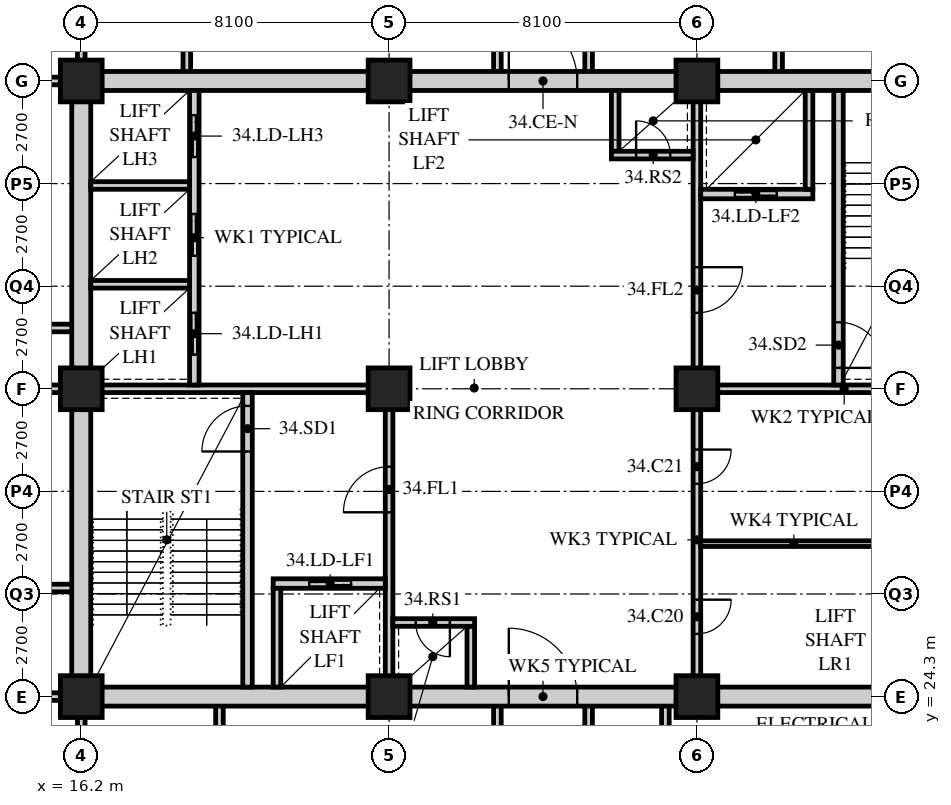
"""IFC4 building model, lengths in metres.
Left out: names, types, materials, properties, quantities, classifications, styles, units other than length and angle.
Written with IfcOpenShell. Run it as: python <this file> out.ifc"""

import sys

from ifc_helpers import new_model, si_unit, direction, frame, frame_2d, origin, origin_2d, place, context, subcontext, project, spatial, rectangle, hollow_rectangle, extrude, element, fill, save


model = new_model("IFC4")
c1 = context("Model", 3, precision=1e-05, world=origin(), true_north=direction((0.0, 1.0)))
c2 = subcontext(c1, "Body", "Model", "MODEL_VIEW")
j1 = project(units=[si_unit("LENGTHUNIT", "METRE"), si_unit("PLANEANGLEUNIT", "RADIAN")], contexts=[c1])
p1 = place(None, origin())
s1 = spatial("IfcSite", under=j1, at=p1, CompositionType="ELEMENT")
p2 = place(p1, origin())
s2 = spatial("IfcBuilding", under=s1, at=p2, CompositionType="ELEMENT")
p3 = place(p2, frame((0.0, 0.0, 134.0)))
s3 = spatial("IfcBuildingStorey", under=s2, at=p3, CompositionType="ELEMENT", Elevation=134.0)
for number, where, z_axis, x_axis in (
    (1, (16.2, 24.3, 0.0), (0.0, 0.0, 1.0), (1.0, 0.0, 0.0)),
    (2, (16.2, 32.4, 0.0), (0.0, 0.0, 1.0), (1.0, 0.0, 0.0)),
    (3, (16.2, 40.5, 0.0), (0.0, 0.0, 1.0), (1.0, 0.0, 0.0)),
    (4, (24.3, 24.3, 0.0), (0.0, 0.0, 1.0), (1.0, 0.0, 0.0)),
    (5, (24.3, 32.4, 0.0), (0.0, 0.0, 1.0), (1.0, 0.0, 0.0)),
    (6, (24.3, 40.5, 0.0), (0.0, 0.0, 1.0), (1.0, 0.0, 0.0)),
    (7, (32.4, 24.3, 0.0), (0.0, 0.0, 1.0), (1.0, 0.0, 0.0)),
    (8, (32.4, 32.4, 0.0), (0.0, 0.0, 1.0), (1.0, 0.0, 0.0)),
    (9, (32.4, 40.5, 0.0), (0.0, 0.0, 1.0), (1.0, 0.0, 0.0)),
):
    element("IfcColumn", number, at=place(p3, frame(where, z_axis=z_axis, x_axis=x_axis)), inside=s3, PredefinedType="COLUMN", context=c2, shape_type="SweptSolid", body=[
        extrude(hollow_rectangle(XDim=1.1, YDim=1.1, WallThickness=0.1, at=origin_2d()), origin(), (0.0, 0.0, 1.0), 3.4),
    ])
for number, where, z_axis, x_axis in (
    (10, (9.9, 32.4, 0.0), (0.0, 0.0, 1.0), (1.0, 0.0, 0.0)),
    (11, (9.9, 27.157, 0.0), (0.0, 0.0, 1.0), (1.0, 0.0, 0.0)),
    (12, (9.9, 34.0, 0.0), (0.0, 0.0, 1.0), (1.0, 0.0, 0.0)),
):
    element("IfcWall", number, at=place(p3, frame(where, z_axis=z_axis, x_axis=x_axis)), inside=s3, PredefinedType="SOLIDWALL", context=c2, shape_type="SweptSolid", body=[
        extrude(rectangle(XDim=6.3, YDim=0.2, at=frame_2d((3.15, 0.0))), origin(), (0.0, 0.0, 1.0), 3.19),
    ])
p4 = place(p3, frame((16.2, 19.35, 0.0), z_axis=(0.0, 0.0, 1.0), x_axis=(0.0, 1.0, 0.0)))
e13 = element("IfcWall", 13, at=p4, inside=s3, PredefinedType="SOLIDWALL", context=c2, shape_type="SweptSolid", body=[
    extrude(rectangle(XDim=4.95, YDim=0.2, at=frame_2d((2.475, 0.0))), origin(), (0.0, 0.0, 1.0), 2.49),
])
for number, where, z_axis, x_axis in (
    (14, (19.836, 19.35, 0.0), (0.0, 0.0, 1.0), (0.0, 1.0, 0.0)),
    (15, (31.57, 19.35, 0.0), (0.0, 0.0, 1.0), (0.0, 1.0, 0.0)),
    (16, (27.15, 19.35, 0.0), (0.0, 0.0, 1.0), (0.0, 1.0, 0.0)),
    (17, (29.55, 19.35, 0.0), (0.0, 0.0, 1.0), (0.0, 1.0, 0.0)),
):
    element("IfcWall", number, at=place(p3, frame(where, z_axis=z_axis, x_axis=x_axis)), inside=s3, PredefinedType="SOLIDWALL", context=c2, shape_type="SweptSolid", body=[
        extrude(rectangle(XDim=4.95, YDim=0.2, at=frame_2d((2.475, 0.0))), origin(), (0.0, 0.0, 1.0), 3.19),
    ])
p5 = place(p3, frame((16.2, 40.5, 0.0), z_axis=(0.0, 0.0, 1.0), x_axis=(0.0, 1.0, 0.0)))
e18 = element("IfcWall", 18, at=p5, inside=s3, PredefinedType="SOLIDWALL", context=c2, shape_type="SweptSolid", body=[
    extrude(rectangle(XDim=3.6, YDim=0.2, at=frame_2d((1.8, 0.0))), origin(), (0.0, 0.0, 1.0), 2.578),
])
for number, where, z_axis, x_axis in (
    (19, (18.978, 44.1, 0.0), (0.0, 0.0, 1.0), (0.0, -1.0, 0.0)),
    (20, (34.55, 44.1, 0.0), (0.0, 0.0, 1.0), (0.0, -1.0, 0.0)),
    (21, (27.15, 40.5, 0.0), (0.0, 0.0, 1.0), (0.0, 1.0, 0.0)),
    (22, (29.55, 40.5, 0.0), (0.0, 0.0, 1.0), (0.0, 1.0, 0.0)),
):
    element("IfcWall", number, at=place(p3, frame(where, z_axis=z_axis, x_axis=x_axis)), inside=s3, PredefinedType="SOLIDWALL", context=c2, shape_type="SweptSolid", body=[
        extrude(rectangle(XDim=3.6, YDim=0.2, at=frame_2d((1.8, 0.0))), origin(), (0.0, 0.0, 1.0), 3.19),
    ])
for number, where, z_axis, x_axis in (
    (23, (9.9, 24.3, 0.0), (0.0, 0.0, 1.0), (1.0, 0.0, 0.0)),
    (24, (9.9, 40.5, 0.0), (0.0, 0.0, 1.0), (1.0, 0.0, 0.0)),
):
    element("IfcWall", number, at=place(p3, frame(where, z_axis=z_axis, x_axis=x_axis)), inside=s3, PredefinedType="SOLIDWALL", context=c2, shape_type="SweptSolid", body=[
        extrude(rectangle(XDim=6.3, YDim=0.2, at=frame_2d((3.15, 0.0))), origin(), (0.0, 0.0, 1.0), 3.19),
    ])
p6 = place(p3, frame((15.95, 24.3, 0.0), z_axis=(0.0, 0.0, 1.0), x_axis=(1.0, 0.0, 0.0)))
e25 = element("IfcWall", 25, at=p6, inside=s3, PredefinedType="SOLIDWALL", context=c2, shape_type="SweptSolid", body=[
    extrude(rectangle(XDim=24.8, YDim=0.5, at=frame_2d((12.4, 0.0))), origin(), (0.0, 0.0, 1.0), 2.54),
])
p7 = place(p6, frame((11.5, 0.0, 0.0)))
e26 = element("IfcOpeningElement", 26, at=p7, cuts=e25, PredefinedType="OPENING", context=c2, shape_type="SweptSolid", body=[
    extrude(rectangle(XDim=1.8, YDim=2.4, at=frame_2d((0.9, 1.2))), frame((0.0, 0.26, 0.0), z_axis=(0.0, -1.0, 0.0), x_axis=(1.0, 0.0, 0.0)), (0.0, 0.0, 1.0), 0.52),
])
p8 = place(p3, frame((15.95, 40.5, 0.0), z_axis=(0.0, 0.0, 1.0), x_axis=(1.0, 0.0, 0.0)))
e27 = element("IfcWall", 27, at=p8, inside=s3, PredefinedType="SOLIDWALL", context=c2, shape_type="SweptSolid", body=[
    extrude(rectangle(XDim=24.8, YDim=0.5, at=frame_2d((12.4, 0.0))), origin(), (0.0, 0.0, 1.0), 2.54),
])
p9 = place(p8, frame((11.5, 0.0, 0.0)))
e28 = element("IfcOpeningElement", 28, at=p9, cuts=e27, PredefinedType="OPENING", context=c2, shape_type="SweptSolid", body=[
    extrude(rectangle(XDim=1.8, YDim=2.4, at=frame_2d((0.9, 1.2))), frame((0.0, 0.26, 0.0), z_axis=(0.0, -1.0, 0.0), x_axis=(1.0, 0.0, 0.0)), (0.0, 0.0, 1.0), 0.52),
])
p10 = place(p3, frame((16.2, 24.55, 0.0), z_axis=(0.0, 0.0, 1.0), x_axis=(0.0, 1.0, 0.0)))
e29 = element("IfcWall", 29, at=p10, inside=s3, PredefinedType="SOLIDWALL", context=c2, shape_type="SweptSolid", body=[
    extrude(rectangle(XDim=15.7, YDim=0.5, at=frame_2d((7.85, 0.0))), origin(), (0.0, 0.0, 1.0), 2.578),
])
p11 = place(p3, frame((16.45, 32.4, 0.0), z_axis=(0.0, 0.0, 1.0), x_axis=(1.0, 0.0, 0.0)))
e30 = element("IfcWall", 30, at=p11, inside=s3, PredefinedType="SOLIDWALL", context=c2, shape_type="SweptSolid", body=[
    extrude(rectangle(XDim=7.95, YDim=0.2, at=frame_2d((3.975, 0.0))), origin(), (0.0, 0.0, 1.0), 2.578),
])
p12 = place(p3, frame((24.3, 24.55, 0.0), z_axis=(0.0, 0.0, 1.0), x_axis=(0.0, 1.0, 0.0)))
e31 = element("IfcWall", 31, at=p12, inside=s3, PredefinedType="SOLIDWALL", context=c2, shape_type="SweptSolid", body=[
    extrude(rectangle(XDim=7.75, YDim=0.2, at=frame_2d((3.875, 0.0))), origin(), (0.0, 0.0, 1.0), 2.578),
])
p13 = place(p12, frame((4.6, 0.0, 0.0)))
e32 = element("IfcOpeningElement", 32, at=p13, cuts=e31, PredefinedType="OPENING", context=c2, shape_type="SweptSolid", body=[
    extrude(rectangle(XDim=1.2, YDim=2.1, at=frame_2d((0.6, 1.05))), frame((0.0, 0.11, 0.0), z_axis=(0.0, -1.0, 0.0), x_axis=(1.0, 0.0, 0.0)), (0.0, 0.0, 1.0), 0.22),
])
p14 = place(p3, frame((20.575, 24.55, 0.0), z_axis=(0.0, 0.0, 1.0), x_axis=(0.0, 1.0, 0.0)))
e33 = element("IfcWall", 33, at=p14, inside=s3, PredefinedType="SOLIDWALL", context=c2, shape_type="SweptSolid", body=[
    extrude(rectangle(XDim=7.75, YDim=0.25, at=frame_2d((3.875, 0.0))), origin(), (0.0, 0.0, 1.0), 3.19),
])
p15 = place(p14, frame((6.2, 0.0, 0.0)))
e34 = element("IfcOpeningElement", 34, at=p15, cuts=e33, PredefinedType="OPENING", context=c2, shape_type="SweptSolid", body=[
    extrude(rectangle(XDim=1.2, YDim=2.1, at=frame_2d((0.6, 1.05))), frame((0.0, 0.135, 0.0), z_axis=(0.0, -1.0, 0.0), x_axis=(1.0, 0.0, 0.0)), (0.0, 0.0, 1.0), 0.27),
])
p16 = place(p3, frame((21.25, 27.275, 0.0), z_axis=(0.0, 0.0, 1.0), x_axis=(1.0, 0.0, 0.0)))
e35 = element("IfcWall", 35, at=p16, inside=s3, PredefinedType="SOLIDWALL", context=c2, shape_type="SweptSolid", body=[
    extrude(rectangle(XDim=2.95, YDim=0.25, at=frame_2d((1.475, 0.0))), origin(), (0.0, 0.0, 1.0), 3.19),
])
p17 = place(p16, frame((0.95, 0.0, 0.0)))
e36 = element("IfcOpeningElement", 36, at=p17, cuts=e35, PredefinedType="OPENING", context=c2, shape_type="SweptSolid", body=[
    extrude(rectangle(XDim=1.1, YDim=2.4, at=frame_2d((0.55, 1.2))), frame((0.0, 0.135, 0.0), z_axis=(0.0, -1.0, 0.0), x_axis=(1.0, 0.0, 0.0)), (0.0, 0.0, 1.0), 0.27),
])
p18 = place(p3, frame((21.35, 24.55, 0.0), z_axis=(0.0, 0.0, 1.0), x_axis=(0.0, 1.0, 0.0)))
e37 = element("IfcWall", 37, at=p18, inside=s3, PredefinedType="SOLIDWALL", context=c2, shape_type="SweptSolid", body=[
    extrude(rectangle(XDim=2.6, YDim=0.2, at=frame_2d((1.3, 0.0))), origin(), (0.0, 0.0, 1.0), 3.19),
])
p19 = place(p3, frame((19.175, 32.5, 0.0), z_axis=(0.0, 0.0, 1.0), x_axis=(0.0, 1.0, 0.0)))
e38 = element("IfcWall", 38, at=p19, inside=s3, PredefinedType="SOLIDWALL", context=c2, shape_type="SweptSolid", body=[
    extrude(rectangle(XDim=7.75, YDim=0.25, at=frame_2d((3.875, 0.0))), origin(), (0.0, 0.0, 1.0), 3.19),
])
p20 = place(p19, frame((0.8, 0.0, 0.0)))
e39 = element("IfcOpeningElement", 39, at=p20, cuts=e38, PredefinedType="OPENING", context=c2, shape_type="SweptSolid", body=[
    extrude(rectangle(XDim=1.1, YDim=2.4, at=frame_2d((0.55, 1.2))), frame((0.0, 0.135, 0.0), z_axis=(0.0, -1.0, 0.0), x_axis=(1.0, 0.0, 0.0)), (0.0, 0.0, 1.0), 0.27),
])
p21 = place(p19, frame((3.4, 0.0, 0.0)))
e40 = element("IfcOpeningElement", 40, at=p21, cuts=e38, PredefinedType="OPENING", context=c2, shape_type="SweptSolid", body=[
    extrude(rectangle(XDim=1.1, YDim=2.4, at=frame_2d((0.55, 1.2))), frame((0.0, 0.135, 0.0), z_axis=(0.0, -1.0, 0.0), x_axis=(1.0, 0.0, 0.0)), (0.0, 0.0, 1.0), 0.27),
])
p22 = place(p19, frame((6.0, 0.0, 0.0)))
e41 = element("IfcOpeningElement", 41, at=p22, cuts=e38, PredefinedType="OPENING", context=c2, shape_type="SweptSolid", body=[
    extrude(rectangle(XDim=1.1, YDim=2.4, at=frame_2d((0.55, 1.2))), frame((0.0, 0.135, 0.0), z_axis=(0.0, -1.0, 0.0), x_axis=(1.0, 0.0, 0.0)), (0.0, 0.0, 1.0), 0.27),
])
for number, where, z_axis, x_axis in (
    (42, (16.45, 35.15, 0.0), (0.0, 0.0, 1.0), (1.0, 0.0, 0.0)),
    (43, (16.45, 37.75, 0.0), (0.0, 0.0, 1.0), (1.0, 0.0, 0.0)),
):
    element("IfcWall", number, at=place(p3, frame(where, z_axis=z_axis, x_axis=x_axis)), inside=s3, PredefinedType="SOLIDWALL", context=c2, shape_type="SweptSolid", body=[
        extrude(rectangle(XDim=2.6, YDim=0.2, at=frame_2d((1.3, 0.0))), origin(), (0.0, 0.0, 1.0), 3.19),
    ])
p23 = place(p3, frame((26.45, 24.55, 0.0), z_axis=(0.0, 0.0, 1.0), x_axis=(0.0, 1.0, 0.0)))
e44 = element("IfcWall", 44, at=p23, inside=s3, PredefinedType="SOLIDWALL", context=c2, shape_type="SweptSolid", body=[
    extrude(rectangle(XDim=1.6, YDim=0.2, at=frame_2d((0.8, 0.0))), origin(), (0.0, 0.0, 1.0), 3.19),
])
p24 = place(p3, frame((24.4, 26.25, 0.0), z_axis=(0.0, 0.0, 1.0), x_axis=(1.0, 0.0, 0.0)))
e45 = element("IfcWall", 45, at=p24, inside=s3, PredefinedType="SOLIDWALL", context=c2, shape_type="SweptSolid", body=[
    extrude(rectangle(XDim=2.15, YDim=0.2, at=frame_2d((1.075, 0.0))), origin(), (0.0, 0.0, 1.0), 3.19),
])
p25 = place(p24, frame((0.6, 0.0, 0.0)))
e46 = element("IfcOpeningElement", 46, at=p25, cuts=e45, PredefinedType="OPENING", context=c2, shape_type="SweptSolid", body=[
    extrude(rectangle(XDim=0.9, YDim=2.1, at=frame_2d((0.45, 1.05))), frame((0.0, 0.11, 0.0), z_axis=(0.0, -1.0, 0.0), x_axis=(1.0, 0.0, 0.0)), (0.0, 0.0, 1.0), 0.22),
])
p26 = place(p3, frame((32.3, 32.4, 0.0), z_axis=(0.0, 0.0, 1.0), x_axis=(1.0, 0.0, 0.0)))
e47 = element("IfcWall", 47, at=p26, inside=s3, PredefinedType="SOLIDWALL", context=c2, shape_type="SweptSolid", body=[
    extrude(rectangle(XDim=7.95, YDim=0.2, at=frame_2d((3.975, 0.0))), origin(), (0.0, 0.0, 1.0), 2.578),
])
p27 = place(p3, frame((32.4, 32.5, 0.0), z_axis=(0.0, 0.0, 1.0), x_axis=(0.0, 1.0, 0.0)))
e48 = element("IfcWall", 48, at=p27, inside=s3, PredefinedType="SOLIDWALL", context=c2, shape_type="SweptSolid", body=[
    extrude(rectangle(XDim=7.75, YDim=0.2, at=frame_2d((3.875, 0.0))), origin(), (0.0, 0.0, 1.0), 2.578),
])
p28 = place(p27, frame((1.9, 0.0, 0.0)))
e49 = element("IfcOpeningElement", 49, at=p28, cuts=e48, PredefinedType="OPENING", context=c2, shape_type="SweptSolid", body=[
    extrude(rectangle(XDim=1.2, YDim=2.1, at=frame_2d((0.6, 1.05))), frame((0.0, 0.11, 0.0), z_axis=(0.0, -1.0, 0.0), x_axis=(1.0, 0.0, 0.0)), (0.0, 0.0, 1.0), 0.22),
])
p29 = place(p3, frame((36.125, 32.5, 0.0), z_axis=(0.0, 0.0, 1.0), x_axis=(0.0, 1.0, 0.0)))
e50 = element("IfcWall", 50, at=p29, inside=s3, PredefinedType="SOLIDWALL", context=c2, shape_type="SweptSolid", body=[
    extrude(rectangle(XDim=7.75, YDim=0.25, at=frame_2d((3.875, 0.0))), origin(), (0.0, 0.0, 1.0), 3.19),
])
p30 = place(p29, frame((0.45, 0.0, 0.0)))
e51 = element("IfcOpeningElement", 51, at=p30, cuts=e50, PredefinedType="OPENING", context=c2, shape_type="SweptSolid", body=[
    extrude(rectangle(XDim=1.2, YDim=2.1, at=frame_2d((0.6, 1.05))), frame((0.0, 0.135, 0.0), z_axis=(0.0, -1.0, 0.0), x_axis=(1.0, 0.0, 0.0)), (0.0, 0.0, 1.0), 0.27),
])
p31 = place(p3, frame((32.5, 37.525, 0.0), z_axis=(0.0, 0.0, 1.0), x_axis=(1.0, 0.0, 0.0)))
e52 = element("IfcWall", 52, at=p31, inside=s3, PredefinedType="SOLIDWALL", context=c2, shape_type="SweptSolid", body=[
    extrude(rectangle(XDim=2.95, YDim=0.25, at=frame_2d((1.475, 0.0))), origin(), (0.0, 0.0, 1.0), 3.19),
])
p32 = place(p31, frame((0.9, 0.0, 0.0)))
e53 = element("IfcOpeningElement", 53, at=p32, cuts=e52, PredefinedType="OPENING", context=c2, shape_type="SweptSolid", body=[
    extrude(rectangle(XDim=1.1, YDim=2.4, at=frame_2d((0.55, 1.2))), frame((0.0, 0.135, 0.0), z_axis=(0.0, -1.0, 0.0), x_axis=(1.0, 0.0, 0.0)), (0.0, 0.0, 1.0), 0.27),
])
p33 = place(p3, frame((35.35, 37.65, 0.0), z_axis=(0.0, 0.0, 1.0), x_axis=(0.0, 1.0, 0.0)))
e54 = element("IfcWall", 54, at=p33, inside=s3, PredefinedType="SOLIDWALL", context=c2, shape_type="SweptSolid", body=[
    extrude(rectangle(XDim=2.6, YDim=0.2, at=frame_2d((1.3, 0.0))), origin(), (0.0, 0.0, 1.0), 3.19),
])
p34 = place(p3, frame((30.25, 38.65, 0.0), z_axis=(0.0, 0.0, 1.0), x_axis=(0.0, 1.0, 0.0)))
e55 = element("IfcWall", 55, at=p34, inside=s3, PredefinedType="SOLIDWALL", context=c2, shape_type="SweptSolid", body=[
    extrude(rectangle(XDim=1.6, YDim=0.2, at=frame_2d((0.8, 0.0))), origin(), (0.0, 0.0, 1.0), 3.19),
])
p35 = place(p3, frame((30.15, 38.55, 0.0), z_axis=(0.0, 0.0, 1.0), x_axis=(1.0, 0.0, 0.0)))
e56 = element("IfcWall", 56, at=p35, inside=s3, PredefinedType="SOLIDWALL", context=c2, shape_type="SweptSolid", body=[
    extrude(rectangle(XDim=2.15, YDim=0.2, at=frame_2d((1.075, 0.0))), origin(), (0.0, 0.0, 1.0), 3.19),
])
p36 = place(p35, frame((0.65, 0.0, 0.0)))
e57 = element("IfcOpeningElement", 57, at=p36, cuts=e56, PredefinedType="OPENING", context=c2, shape_type="SweptSolid", body=[
    extrude(rectangle(XDim=0.9, YDim=2.1, at=frame_2d((0.45, 1.05))), frame((0.0, 0.11, 0.0), z_axis=(0.0, -1.0, 0.0), x_axis=(1.0, 0.0, 0.0)), (0.0, 0.0, 1.0), 0.22),
])
p37 = place(p3, frame((32.4, 24.55, 0.0), z_axis=(0.0, 0.0, 1.0), x_axis=(0.0, 1.0, 0.0)))
e58 = element("IfcWall", 58, at=p37, inside=s3, PredefinedType="PARTITIONING", context=c2, shape_type="SweptSolid", body=[
    extrude(rectangle(XDim=7.75, YDim=0.2, at=frame_2d((3.875, 0.0))), origin(), (0.0, 0.0, 1.0), 2.578),
])
p38 = place(p37, frame((1.4, 0.0, 0.0)))
e59 = element("IfcOpeningElement", 59, at=p38, cuts=e58, PredefinedType="OPENING", context=c2, shape_type="SweptSolid", body=[
    extrude(rectangle(XDim=0.9, YDim=2.1, at=frame_2d((0.45, 1.05))), frame((0.0, 0.11, 0.0), z_axis=(0.0, -1.0, 0.0), x_axis=(1.0, 0.0, 0.0)), (0.0, 0.0, 1.0), 0.22),
])
p39 = place(p37, frame((5.35, 0.0, 0.0)))
e60 = element("IfcOpeningElement", 60, at=p39, cuts=e58, PredefinedType="OPENING", context=c2, shape_type="SweptSolid", body=[
    extrude(rectangle(XDim=0.9, YDim=2.1, at=frame_2d((0.45, 1.05))), frame((0.0, 0.11, 0.0), z_axis=(0.0, -1.0, 0.0), x_axis=(1.0, 0.0, 0.0)), (0.0, 0.0, 1.0), 0.22),
])
p40 = place(p3, frame((32.5, 28.325, 0.0), z_axis=(0.0, 0.0, 1.0), x_axis=(1.0, 0.0, 0.0)))
e61 = element("IfcWall", 61, at=p40, inside=s3, PredefinedType="PARTITIONING", context=c2, shape_type="SweptSolid", body=[
    extrude(rectangle(XDim=4.9, YDim=0.15, at=frame_2d((2.45, 0.0))), origin(), (0.0, 0.0, 1.0), 3.19),
])
p41 = place(p38, origin())
e62 = element("IfcDoor", 62, at=p41, inside=s3, OperationType="SINGLE_SWING_LEFT", PredefinedType="DOOR", context=c2, shape_type="SweptSolid", body=[
    extrude(rectangle(XDim=0.9, YDim=2.1, at=frame_2d((0.45, 1.05))), frame((0.0, 0.025, 0.0), z_axis=(0.0, -1.0, 0.0), x_axis=(1.0, 0.0, 0.0)), (0.0, 0.0, 1.0), 0.05),
])
fill(e59, e62)
p42 = place(p39, origin())
e63 = element("IfcDoor", 63, at=p42, inside=s3, OperationType="SINGLE_SWING_LEFT", PredefinedType="DOOR", context=c2, shape_type="SweptSolid", body=[
    extrude(rectangle(XDim=0.9, YDim=2.1, at=frame_2d((0.45, 1.05))), frame((0.0, 0.025, 0.0), z_axis=(0.0, -1.0, 0.0), x_axis=(1.0, 0.0, 0.0)), (0.0, 0.0, 1.0), 0.05),
])
fill(e60, e63)
p43 = place(p15, origin())
e64 = element("IfcDoor", 64, at=p43, inside=s3, OperationType="SINGLE_SWING_LEFT", PredefinedType="DOOR", context=c2, shape_type="SweptSolid", body=[
    extrude(rectangle(XDim=1.2, YDim=2.1, at=frame_2d((0.6, 1.05))), frame((0.0, 0.025, 0.0), z_axis=(0.0, -1.0, 0.0), x_axis=(1.0, 0.0, 0.0)), (0.0, 0.0, 1.0), 0.05),
])
fill(e34, e64)
p44 = place(p13, origin())
e65 = element("IfcDoor", 65, at=p44, inside=s3, OperationType="SINGLE_SWING_LEFT", PredefinedType="DOOR", context=c2, shape_type="SweptSolid", body=[
    extrude(rectangle(XDim=1.2, YDim=2.1, at=frame_2d((0.6, 1.05))), frame((0.0, 0.025, 0.0), z_axis=(0.0, -1.0, 0.0), x_axis=(1.0, 0.0, 0.0)), (0.0, 0.0, 1.0), 0.05),
])
fill(e32, e65)
p45 = place(p25, origin())
e66 = element("IfcDoor", 66, at=p45, inside=s3, OperationType="SINGLE_SWING_LEFT", PredefinedType="DOOR", context=c2, shape_type="SweptSolid", body=[
    extrude(rectangle(XDim=0.9, YDim=2.1, at=frame_2d((0.45, 1.05))), frame((0.0, 0.025, 0.0), z_axis=(0.0, -1.0, 0.0), x_axis=(1.0, 0.0, 0.0)), (0.0, 0.0, 1.0), 0.05),
])
fill(e46, e66)
p46 = place(p30, origin())
e67 = element("IfcDoor", 67, at=p46, inside=s3, OperationType="SINGLE_SWING_RIGHT", PredefinedType="DOOR", context=c2, shape_type="SweptSolid", body=[
    extrude(rectangle(XDim=1.2, YDim=2.1, at=frame_2d((0.6, 1.05))), frame((0.0, 0.025, 0.0), z_axis=(0.0, -1.0, 0.0), x_axis=(1.0, 0.0, 0.0)), (0.0, 0.0, 1.0), 0.05),
])
fill(e51, e67)
p47 = place(p28, origin())
e68 = element("IfcDoor", 68, at=p47, inside=s3, OperationType="SINGLE_SWING_LEFT", PredefinedType="DOOR", context=c2, shape_type="SweptSolid", body=[
    extrude(rectangle(XDim=1.2, YDim=2.1, at=frame_2d((0.6, 1.05))), frame((0.0, 0.025, 0.0), z_axis=(0.0, -1.0, 0.0), x_axis=(1.0, 0.0, 0.0)), (0.0, 0.0, 1.0), 0.05),
])
fill(e49, e68)
p48 = place(p36, origin())
e69 = element("IfcDoor", 69, at=p48, inside=s3, OperationType="SINGLE_SWING_LEFT", PredefinedType="DOOR", context=c2, shape_type="SweptSolid", body=[
    extrude(rectangle(XDim=0.9, YDim=2.1, at=frame_2d((0.45, 1.05))), frame((0.0, 0.025, 0.0), z_axis=(0.0, -1.0, 0.0), x_axis=(1.0, 0.0, 0.0)), (0.0, 0.0, 1.0), 0.05),
])
fill(e57, e69)
p49 = place(p20, origin())
e70 = element("IfcDoor", 70, at=p49, inside=s3, OperationType="DOUBLE_DOOR_SLIDING", PredefinedType="DOOR", context=c2, shape_type="SweptSolid", body=[
    extrude(rectangle(XDim=1.1, YDim=2.4, at=frame_2d((0.55, 1.2))), frame((0.0, 0.025, 0.0), z_axis=(0.0, -1.0, 0.0), x_axis=(1.0, 0.0, 0.0)), (0.0, 0.0, 1.0), 0.05),
])
fill(e39, e70)
p50 = place(p21, origin())
e71 = element("IfcDoor", 71, at=p50, inside=s3, OperationType="DOUBLE_DOOR_SLIDING", PredefinedType="DOOR", context=c2, shape_type="SweptSolid", body=[
    extrude(rectangle(XDim=1.1, YDim=2.4, at=frame_2d((0.55, 1.2))), frame((0.0, 0.025, 0.0), z_axis=(0.0, -1.0, 0.0), x_axis=(1.0, 0.0, 0.0)), (0.0, 0.0, 1.0), 0.05),
])
fill(e40, e71)
p51 = place(p22, origin())
e72 = element("IfcDoor", 72, at=p51, inside=s3, OperationType="DOUBLE_DOOR_SLIDING", PredefinedType="DOOR", context=c2, shape_type="SweptSolid", body=[
    extrude(rectangle(XDim=1.1, YDim=2.4, at=frame_2d((0.55, 1.2))), frame((0.0, 0.025, 0.0), z_axis=(0.0, -1.0, 0.0), x_axis=(1.0, 0.0, 0.0)), (0.0, 0.0, 1.0), 0.05),
])
fill(e41, e72)
p52 = place(p17, origin())
e73 = element("IfcDoor", 73, at=p52, inside=s3, OperationType="DOUBLE_DOOR_SLIDING", PredefinedType="DOOR", context=c2, shape_type="SweptSolid", body=[
    extrude(rectangle(XDim=1.1, YDim=2.4, at=frame_2d((0.55, 1.2))), frame((0.0, 0.025, 0.0), z_axis=(0.0, -1.0, 0.0), x_axis=(1.0, 0.0, 0.0)), (0.0, 0.0, 1.0), 0.05),
])
fill(e36, e73)
p53 = place(p32, origin())
e74 = element("IfcDoor", 74, at=p53, inside=s3, OperationType="DOUBLE_DOOR_SLIDING", PredefinedType="DOOR", context=c2, shape_type="SweptSolid", body=[
    extrude(rectangle(XDim=1.1, YDim=2.4, at=frame_2d((0.55, 1.2))), frame((0.0, 0.025, 0.0), z_axis=(0.0, -1.0, 0.0), x_axis=(1.0, 0.0, 0.0)), (0.0, 0.0, 1.0), 0.05),
])
fill(e53, e74)
p54 = place(p7, origin())
e75 = element("IfcDoor", 75, at=p54, inside=s3, OperationType="DOUBLE_DOOR_SINGLE_SWING", PredefinedType="DOOR", context=c2, shape_type="SweptSolid", body=[
    extrude(rectangle(XDim=1.8, YDim=2.4, at=frame_2d((0.9, 1.2))), frame((0.0, 0.025, 0.0), z_axis=(0.0, -1.0, 0.0), x_axis=(1.0, 0.0, 0.0)), (0.0, 0.0, 1.0), 0.05),
])
fill(e26, e75)
p55 = place(p9, origin())
e76 = element("IfcDoor", 76, at=p55, inside=s3, OperationType="DOUBLE_DOOR_SINGLE_SWING", PredefinedType="DOOR", context=c2, shape_type="SweptSolid", body=[
    extrude(rectangle(XDim=1.8, YDim=2.4, at=frame_2d((0.9, 1.2))), frame((0.0, 0.025, 0.0), z_axis=(0.0, -1.0, 0.0), x_axis=(1.0, 0.0, 0.0)), (0.0, 0.0, 1.0), 0.05),
])
fill(e28, e76)
save(model, sys.argv[1])
